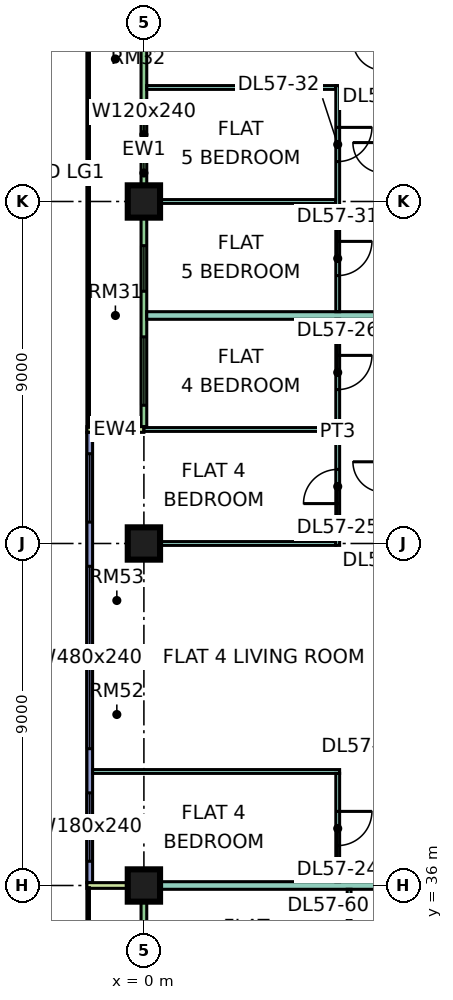
"""IFC4 building model, lengths in metres.
Left out: names, types, materials, properties, quantities, classifications, styles, units other than length and angle.
Written with IfcOpenShell. Run it as: python <this file> out.ifc"""

import sys

from ifc_helpers import new_model, si_unit, direction, frame, frame_2d, origin, origin_2d, place, context, subcontext, project, spatial, rectangle, extrude, element, fill, save


model = new_model("IFC4")
c1 = context("Model", 3, precision=1e-05, world=origin(), true_north=direction((0.0, 1.0)))
c2 = subcontext(c1, "Body", "Model", "MODEL_VIEW")
j1 = project(units=[si_unit("LENGTHUNIT", "METRE"), si_unit("PLANEANGLEUNIT", "RADIAN")], contexts=[c1])
p1 = place(None, origin())
s1 = spatial("IfcSite", under=j1, at=p1, CompositionType="ELEMENT")
p2 = place(p1, origin())
s2 = spatial("IfcBuilding", under=s1, at=p2, CompositionType="ELEMENT")
p3 = place(p2, frame((0.0, 0.0, 241.65)))
s3 = spatial("IfcBuildingStorey", under=s2, at=p3, CompositionType="ELEMENT", Elevation=241.65)
p4 = place(p3, frame((0.0, 36.0, 0.0), z_axis=(0.0, 0.0, 1.0), x_axis=(1.0, 0.0, 0.0)))
e1 = element("IfcColumn", 1, at=p4, inside=s3, PredefinedType="COLUMN", context=c2, shape_type="SweptSolid", body=[
    extrude(rectangle(XDim=0.85, YDim=0.85, at=origin_2d()), origin(), (0.0, 0.0, 1.0), 3.75),
])
p5 = place(p3, frame((0.0, 45.0, 0.0), z_axis=(0.0, 0.0, 1.0), x_axis=(1.0, 0.0, 0.0)))
e2 = element("IfcColumn", 2, at=p5, inside=s3, PredefinedType="COLUMN", context=c2, shape_type="SweptSolid", body=[
    extrude(rectangle(XDim=0.85, YDim=0.85, at=origin_2d()), origin(), (0.0, 0.0, 1.0), 3.75),
])
p6 = place(p3, frame((0.0, 54.0, 0.0), z_axis=(0.0, 0.0, 1.0), x_axis=(1.0, 0.0, 0.0)))
e3 = element("IfcColumn", 3, at=p6, inside=s3, PredefinedType="COLUMN", context=c2, shape_type="SweptSolid", body=[
    extrude(rectangle(XDim=0.85, YDim=0.85, at=origin_2d()), origin(), (0.0, 0.0, 1.0), 3.75),
])
p7 = place(p3, frame((0.0, 61.425, 0.0), z_axis=(0.0, 0.0, 1.0), x_axis=(0.0, -1.0, 0.0)))
e4 = element("IfcWall", 4, at=p7, inside=s3, PredefinedType="SOLIDWALL", context=c2, shape_type="SweptSolid", body=[
    extrude(rectangle(XDim=13.35, YDim=0.15, at=frame_2d((6.675, 0.0))), origin(), (0.0, 0.0, 1.0), 3.35),
])
p8 = place(p7, frame((1.312, 0.0, 0.0)))
e5 = element("IfcOpeningElement", 5, at=p8, cuts=e4, PredefinedType="OPENING", context=c2, shape_type="SweptSolid", body=[
    extrude(rectangle(XDim=1.8, YDim=2.4, at=frame_2d((0.9, 1.2))), frame((0.0, 0.085, 0.0), z_axis=(0.0, -1.0, 0.0), x_axis=(1.0, 0.0, 0.0)), (0.0, 0.0, 1.0), 0.17),
])
p9 = place(p7, frame((5.062, 0.0, 0.45)))
e6 = element("IfcOpeningElement", 6, at=p9, cuts=e4, PredefinedType="OPENING", context=c2, shape_type="SweptSolid", body=[
    extrude(rectangle(XDim=1.2, YDim=2.4, at=frame_2d((0.6, 1.2))), frame((0.0, 0.085, 0.0), z_axis=(0.0, -1.0, 0.0), x_axis=(1.0, 0.0, 0.0)), (0.0, 0.0, 1.0), 0.17),
])
p10 = place(p7, frame((8.587, 0.0, 0.45)))
e7 = element("IfcOpeningElement", 7, at=p10, cuts=e4, PredefinedType="OPENING", context=c2, shape_type="SweptSolid", body=[
    extrude(rectangle(XDim=1.2, YDim=2.4, at=frame_2d((0.6, 1.2))), frame((0.0, 0.085, 0.0), z_axis=(0.0, -1.0, 0.0), x_axis=(1.0, 0.0, 0.0)), (0.0, 0.0, 1.0), 0.17),
])
p11 = place(p7, frame((10.988, 0.0, 0.45)))
e8 = element("IfcOpeningElement", 8, at=p11, cuts=e4, PredefinedType="OPENING", context=c2, shape_type="SweptSolid", body=[
    extrude(rectangle(XDim=1.8, YDim=2.4, at=frame_2d((0.9, 1.2))), frame((0.0, 0.085, 0.0), z_axis=(0.0, -1.0, 0.0), x_axis=(1.0, 0.0, 0.0)), (0.0, 0.0, 1.0), 0.17),
])
p12 = place(p3, frame((-1.5, 48.0, 0.0), z_axis=(0.0, 0.0, 1.0), x_axis=(1.0, 0.0, 0.0)))
e9 = element("IfcWall", 9, at=p12, inside=s3, PredefinedType="SOLIDWALL", context=c2, shape_type="SweptSolid", body=[
    extrude(rectangle(XDim=1.5, YDim=0.15, at=frame_2d((0.75, 0.0))), origin(), (0.0, 0.0, 1.0), 3.35),
])
p13 = place(p3, frame((-1.425, 47.925, 0.0), z_axis=(0.0, 0.0, 1.0), x_axis=(0.0, -1.0, 0.0)))
e10 = element("IfcWall", 10, at=p13, inside=s3, PredefinedType="SOLIDWALL", context=c2, shape_type="SweptSolid", body=[
    extrude(rectangle(XDim=11.85, YDim=0.15, at=frame_2d((5.925, 0.0))), origin(), (0.0, 0.0, 1.0), 3.35),
])
p14 = place(p13, frame((0.562, 0.0, 0.45)))
e11 = element("IfcOpeningElement", 11, at=p14, cuts=e10, PredefinedType="OPENING", context=c2, shape_type="SweptSolid", body=[
    extrude(rectangle(XDim=1.8, YDim=2.4, at=frame_2d((0.9, 1.2))), frame((0.0, 0.085, 0.0), z_axis=(0.0, -1.0, 0.0), x_axis=(1.0, 0.0, 0.0)), (0.0, 0.0, 1.0), 0.17),
])
p15 = place(p13, frame((3.525, 0.0, 0.45)))
e12 = element("IfcOpeningElement", 12, at=p15, cuts=e10, PredefinedType="OPENING", context=c2, shape_type="SweptSolid", body=[
    extrude(rectangle(XDim=4.8, YDim=2.4, at=frame_2d((2.4, 1.2))), frame((0.0, 0.085, 0.0), z_axis=(0.0, -1.0, 0.0), x_axis=(1.0, 0.0, 0.0)), (0.0, 0.0, 1.0), 0.17),
])
p16 = place(p13, frame((9.488, 0.0, 0.45)))
e13 = element("IfcOpeningElement", 13, at=p16, cuts=e10, PredefinedType="OPENING", context=c2, shape_type="SweptSolid", body=[
    extrude(rectangle(XDim=1.8, YDim=2.4, at=frame_2d((0.9, 1.2))), frame((0.0, 0.085, 0.0), z_axis=(0.0, -1.0, 0.0), x_axis=(1.0, 0.0, 0.0)), (0.0, 0.0, 1.0), 0.17),
])
p17 = place(p3, frame((0.0, 35.925, 0.0), z_axis=(0.0, 0.0, 1.0), x_axis=(0.0, -1.0, 0.0)))
e14 = element("IfcWall", 14, at=p17, inside=s3, PredefinedType="SOLIDWALL", context=c2, shape_type="SweptSolid", body=[
    extrude(rectangle(XDim=11.85, YDim=0.15, at=frame_2d((5.925, 0.0))), origin(), (0.0, 0.0, 1.0), 3.35),
])
p18 = place(p17, frame((1.087, 0.0, 0.0)))
e15 = element("IfcOpeningElement", 15, at=p18, cuts=e14, PredefinedType="OPENING", context=c2, shape_type="SweptSolid", body=[
    extrude(rectangle(XDim=1.2, YDim=2.4, at=frame_2d((0.6, 1.2))), frame((0.0, 0.085, 0.0), z_axis=(0.0, -1.0, 0.0), x_axis=(1.0, 0.0, 0.0)), (0.0, 0.0, 1.0), 0.17),
])
p19 = place(p17, frame((3.525, 0.0, 0.45)))
e16 = element("IfcOpeningElement", 16, at=p19, cuts=e14, PredefinedType="OPENING", context=c2, shape_type="SweptSolid", body=[
    extrude(rectangle(XDim=1.8, YDim=2.4, at=frame_2d((0.9, 1.2))), frame((0.0, 0.085, 0.0), z_axis=(0.0, -1.0, 0.0), x_axis=(1.0, 0.0, 0.0)), (0.0, 0.0, 1.0), 0.17),
])
p20 = place(p17, frame((7.163, 0.0, 0.45)))
e17 = element("IfcOpeningElement", 17, at=p20, cuts=e14, PredefinedType="OPENING", context=c2, shape_type="SweptSolid", body=[
    extrude(rectangle(XDim=3.0, YDim=2.4, at=frame_2d((1.5, 1.2))), frame((0.0, 0.085, 0.0), z_axis=(0.0, -1.0, 0.0), x_axis=(1.0, 0.0, 0.0)), (0.0, 0.0, 1.0), 0.17),
])
p21 = place(p3, frame((-1.5, 36.0, 0.0), z_axis=(0.0, 0.0, 1.0), x_axis=(1.0, 0.0, 0.0)))
e18 = element("IfcWall", 18, at=p21, inside=s3, PredefinedType="SOLIDWALL", context=c2, shape_type="SweptSolid", body=[
    extrude(rectangle(XDim=1.5, YDim=0.15, at=frame_2d((0.75, 0.0))), origin(), (0.0, 0.0, 1.0), 3.35),
])
e19 = element("IfcWall", 19, at=p4, inside=s3, PredefinedType="PARTITIONING", context=c2, shape_type="SweptSolid", body=[
    extrude(rectangle(XDim=6.375, YDim=0.2, at=frame_2d((3.188, 0.0))), origin(), (0.0, 0.0, 1.0), 3.35),
])
p22 = place(p3, frame((-1.35, 39.0, 0.0), z_axis=(0.0, 0.0, 1.0), x_axis=(1.0, 0.0, 0.0)))
e20 = element("IfcWall", 20, at=p22, inside=s3, PredefinedType="PARTITIONING", context=c2, shape_type="SweptSolid", body=[
    extrude(rectangle(XDim=6.5, YDim=0.1, at=frame_2d((3.25, 0.0))), origin(), (0.0, 0.0, 1.0), 3.35),
])
e21 = element("IfcWall", 21, at=p5, inside=s3, PredefinedType="PARTITIONING", context=c2, shape_type="SweptSolid", body=[
    extrude(rectangle(XDim=5.05, YDim=0.1, at=frame_2d((2.525, 0.0))), origin(), (0.0, 0.0, 1.0), 3.35),
])
p23 = place(p3, frame((0.0, 48.0, 0.0), z_axis=(0.0, 0.0, 1.0), x_axis=(1.0, 0.0, 0.0)))
e22 = element("IfcWall", 22, at=p23, inside=s3, PredefinedType="PARTITIONING", context=c2, shape_type="SweptSolid", body=[
    extrude(rectangle(XDim=5.05, YDim=0.1, at=frame_2d((2.525, 0.0))), origin(), (0.0, 0.0, 1.0), 3.35),
])
p24 = place(p3, frame((0.074, 51.0, 0.0), z_axis=(0.0, 0.0, 1.0), x_axis=(1.0, 0.0, 0.0)))
e23 = element("IfcWall", 23, at=p24, inside=s3, PredefinedType="PARTITIONING", context=c2, shape_type="SweptSolid", body=[
    extrude(rectangle(XDim=9.426, YDim=0.2, at=frame_2d((4.713, 0.0))), origin(), (0.0, 0.0, 1.0), 3.35),
])
for number, where, z_axis, x_axis in (
    (24, (0.074, 54.0, 0.0), (0.0, 0.0, 1.0), (1.0, 0.0, 0.0)),
    (25, (0.074, 57.0, 0.0), (0.0, 0.0, 1.0), (1.0, 0.0, 0.0)),
):
    element("IfcWall", number, at=place(p3, frame(where, z_axis=z_axis, x_axis=x_axis)), inside=s3, PredefinedType="PARTITIONING", context=c2, shape_type="SweptSolid", body=[
        extrude(rectangle(XDim=4.976, YDim=0.1, at=frame_2d((2.488, 0.0))), origin(), (0.0, 0.0, 1.0), 3.35),
    ])
p25 = place(p3, frame((5.1, 36.1, 0.0), z_axis=(0.0, 0.0, 1.0), x_axis=(0.0, 1.0, 0.0)))
e26 = element("IfcWall", 26, at=p25, inside=s3, PredefinedType="PARTITIONING", context=c2, shape_type="SweptSolid", body=[
    extrude(rectangle(XDim=2.85, YDim=0.1, at=frame_2d((1.425, 0.0))), origin(), (0.0, 0.0, 1.0), 3.35),
])
p26 = place(p25, frame((0.95, 0.0, 0.0)))
e27 = element("IfcOpeningElement", 27, at=p26, cuts=e26, PredefinedType="OPENING", context=c2, shape_type="SweptSolid", body=[
    extrude(rectangle(XDim=0.9, YDim=2.1, at=frame_2d((0.45, 1.05))), frame((0.0, 0.06, 0.0), z_axis=(0.0, -1.0, 0.0), x_axis=(1.0, 0.0, 0.0)), (0.0, 0.0, 1.0), 0.12),
])
p27 = place(p3, frame((5.1, 44.95, 0.0), z_axis=(0.0, 0.0, 1.0), x_axis=(0.0, 1.0, 0.0)))
e28 = element("IfcWall", 28, at=p27, inside=s3, PredefinedType="PARTITIONING", context=c2, shape_type="SweptSolid", body=[
    extrude(rectangle(XDim=5.95, YDim=0.1, at=frame_2d((2.975, 0.0))), origin(), (0.0, 0.0, 1.0), 3.35),
])
p28 = place(p27, frame((1.1, 0.0, 0.0)))
e29 = element("IfcOpeningElement", 29, at=p28, cuts=e28, PredefinedType="OPENING", context=c2, shape_type="SweptSolid", body=[
    extrude(rectangle(XDim=0.9, YDim=2.1, at=frame_2d((0.45, 1.05))), frame((0.0, 0.06, 0.0), z_axis=(0.0, -1.0, 0.0), x_axis=(1.0, 0.0, 0.0)), (0.0, 0.0, 1.0), 0.12),
])
p29 = place(p27, frame((4.1, 0.0, 0.0)))
e30 = element("IfcOpeningElement", 30, at=p29, cuts=e28, PredefinedType="OPENING", context=c2, shape_type="SweptSolid", body=[
    extrude(rectangle(XDim=0.9, YDim=2.1, at=frame_2d((0.45, 1.05))), frame((0.0, 0.06, 0.0), z_axis=(0.0, -1.0, 0.0), x_axis=(1.0, 0.0, 0.0)), (0.0, 0.0, 1.0), 0.12),
])
p30 = place(p3, frame((5.1, 51.1, 0.0), z_axis=(0.0, 0.0, 1.0), x_axis=(0.0, 1.0, 0.0)))
e31 = element("IfcWall", 31, at=p30, inside=s3, PredefinedType="PARTITIONING", context=c2, shape_type="SweptSolid", body=[
    extrude(rectangle(XDim=5.95, YDim=0.1, at=frame_2d((2.975, 0.0))), origin(), (0.0, 0.0, 1.0), 3.35),
])
p31 = place(p30, frame((0.95, 0.0, 0.0)))
e32 = element("IfcOpeningElement", 32, at=p31, cuts=e31, PredefinedType="OPENING", context=c2, shape_type="SweptSolid", body=[
    extrude(rectangle(XDim=0.9, YDim=2.1, at=frame_2d((0.45, 1.05))), frame((0.0, 0.06, 0.0), z_axis=(0.0, -1.0, 0.0), x_axis=(1.0, 0.0, 0.0)), (0.0, 0.0, 1.0), 0.12),
])
p32 = place(p30, frame((3.95, 0.0, 0.0)))
e33 = element("IfcOpeningElement", 33, at=p32, cuts=e31, PredefinedType="OPENING", context=c2, shape_type="SweptSolid", body=[
    extrude(rectangle(XDim=0.9, YDim=2.1, at=frame_2d((0.45, 1.05))), frame((0.0, 0.06, 0.0), z_axis=(0.0, -1.0, 0.0), x_axis=(1.0, 0.0, 0.0)), (0.0, 0.0, 1.0), 0.12),
])
p33 = place(p3, frame((5.4, 29.95, 0.0), z_axis=(0.0, 0.0, 1.0), x_axis=(0.0, 1.0, 0.0)))
e34 = element("IfcWall", 34, at=p33, inside=s3, PredefinedType="PARTITIONING", context=c2, shape_type="SweptSolid", body=[
    extrude(rectangle(XDim=5.95, YDim=0.1, at=frame_2d((2.975, 0.0))), origin(), (0.0, 0.0, 1.0), 3.35),
])
p34 = place(p33, frame((1.1, 0.0, 0.0)))
e35 = element("IfcOpeningElement", 35, at=p34, cuts=e34, PredefinedType="OPENING", context=c2, shape_type="SweptSolid", body=[
    extrude(rectangle(XDim=0.9, YDim=2.1, at=frame_2d((0.45, 1.05))), frame((0.0, 0.06, 0.0), z_axis=(0.0, -1.0, 0.0), x_axis=(1.0, 0.0, 0.0)), (0.0, 0.0, 1.0), 0.12),
])
p35 = place(p33, frame((4.1, 0.0, 0.0)))
e36 = element("IfcOpeningElement", 36, at=p35, cuts=e34, PredefinedType="OPENING", context=c2, shape_type="SweptSolid", body=[
    extrude(rectangle(XDim=0.9, YDim=2.1, at=frame_2d((0.45, 1.05))), frame((0.0, 0.06, 0.0), z_axis=(0.0, -1.0, 0.0), x_axis=(1.0, 0.0, 0.0)), (0.0, 0.0, 1.0), 0.12),
])
p36 = place(p9, origin())
e37 = element("IfcWindow", 37, at=p36, inside=s3, PartitioningType="SINGLE_PANEL", PredefinedType="WINDOW", context=c2, shape_type="SweptSolid", body=[
    extrude(rectangle(XDim=1.2, YDim=2.4, at=frame_2d((0.6, 1.2))), frame((0.0, 0.03, 0.0), z_axis=(0.0, -1.0, 0.0), x_axis=(1.0, 0.0, 0.0)), (0.0, 0.0, 1.0), 0.06),
])
fill(e6, e37)
p37 = place(p10, origin())
e38 = element("IfcWindow", 38, at=p37, inside=s3, PartitioningType="SINGLE_PANEL", PredefinedType="WINDOW", context=c2, shape_type="SweptSolid", body=[
    extrude(rectangle(XDim=1.2, YDim=2.4, at=frame_2d((0.6, 1.2))), frame((0.0, 0.03, 0.0), z_axis=(0.0, -1.0, 0.0), x_axis=(1.0, 0.0, 0.0)), (0.0, 0.0, 1.0), 0.06),
])
fill(e7, e38)
p38 = place(p11, origin())
e39 = element("IfcWindow", 39, at=p38, inside=s3, PartitioningType="SINGLE_PANEL", PredefinedType="WINDOW", context=c2, shape_type="SweptSolid", body=[
    extrude(rectangle(XDim=1.8, YDim=2.4, at=frame_2d((0.9, 1.2))), frame((0.0, 0.03, 0.0), z_axis=(0.0, -1.0, 0.0), x_axis=(1.0, 0.0, 0.0)), (0.0, 0.0, 1.0), 0.06),
])
fill(e8, e39)
p39 = place(p14, origin())
e40 = element("IfcWindow", 40, at=p39, inside=s3, PartitioningType="SINGLE_PANEL", PredefinedType="WINDOW", context=c2, shape_type="SweptSolid", body=[
    extrude(rectangle(XDim=1.8, YDim=2.4, at=frame_2d((0.9, 1.2))), frame((0.0, 0.03, 0.0), z_axis=(0.0, -1.0, 0.0), x_axis=(1.0, 0.0, 0.0)), (0.0, 0.0, 1.0), 0.06),
])
fill(e11, e40)
p40 = place(p15, origin())
e41 = element("IfcWindow", 41, at=p40, inside=s3, PartitioningType="SINGLE_PANEL", PredefinedType="WINDOW", context=c2, shape_type="SweptSolid", body=[
    extrude(rectangle(XDim=4.8, YDim=2.4, at=frame_2d((2.4, 1.2))), frame((0.0, 0.03, 0.0), z_axis=(0.0, -1.0, 0.0), x_axis=(1.0, 0.0, 0.0)), (0.0, 0.0, 1.0), 0.06),
])
fill(e12, e41)
p41 = place(p16, origin())
e42 = element("IfcWindow", 42, at=p41, inside=s3, PartitioningType="SINGLE_PANEL", PredefinedType="WINDOW", context=c2, shape_type="SweptSolid", body=[
    extrude(rectangle(XDim=1.8, YDim=2.4, at=frame_2d((0.9, 1.2))), frame((0.0, 0.03, 0.0), z_axis=(0.0, -1.0, 0.0), x_axis=(1.0, 0.0, 0.0)), (0.0, 0.0, 1.0), 0.06),
])
fill(e13, e42)
p42 = place(p26, origin())
e43 = element("IfcDoor", 43, at=p42, inside=s3, OperationType="SINGLE_SWING_RIGHT", PredefinedType="DOOR", context=c2, shape_type="SweptSolid", body=[
    extrude(rectangle(XDim=0.9, YDim=2.1, at=frame_2d((0.45, 1.05))), frame((0.0, 0.025, 0.0), z_axis=(0.0, -1.0, 0.0), x_axis=(1.0, 0.0, 0.0)), (0.0, 0.0, 1.0), 0.05),
])
fill(e27, e43)
p43 = place(p28, origin())
e44 = element("IfcDoor", 44, at=p43, inside=s3, OperationType="SINGLE_SWING_LEFT", PredefinedType="DOOR", context=c2, shape_type="SweptSolid", body=[
    extrude(rectangle(XDim=0.9, YDim=2.1, at=frame_2d((0.45, 1.05))), frame((0.0, 0.025, 0.0), z_axis=(0.0, -1.0, 0.0), x_axis=(1.0, 0.0, 0.0)), (0.0, 0.0, 1.0), 0.05),
])
fill(e29, e44)
p44 = place(p29, origin())
e45 = element("IfcDoor", 45, at=p44, inside=s3, OperationType="SINGLE_SWING_RIGHT", PredefinedType="DOOR", context=c2, shape_type="SweptSolid", body=[
    extrude(rectangle(XDim=0.9, YDim=2.1, at=frame_2d((0.45, 1.05))), frame((0.0, 0.025, 0.0), z_axis=(0.0, -1.0, 0.0), x_axis=(1.0, 0.0, 0.0)), (0.0, 0.0, 1.0), 0.05),
])
fill(e30, e45)
p45 = place(p31, origin())
e46 = element("IfcDoor", 46, at=p45, inside=s3, OperationType="SINGLE_SWING_RIGHT", PredefinedType="DOOR", context=c2, shape_type="SweptSolid", body=[
    extrude(rectangle(XDim=0.9, YDim=2.1, at=frame_2d((0.45, 1.05))), frame((0.0, 0.025, 0.0), z_axis=(0.0, -1.0, 0.0), x_axis=(1.0, 0.0, 0.0)), (0.0, 0.0, 1.0), 0.05),
])
fill(e32, e46)
p46 = place(p32, origin())
e47 = element("IfcDoor", 47, at=p46, inside=s3, OperationType="SINGLE_SWING_RIGHT", PredefinedType="DOOR", context=c2, shape_type="SweptSolid", body=[
    extrude(rectangle(XDim=0.9, YDim=2.1, at=frame_2d((0.45, 1.05))), frame((0.0, 0.025, 0.0), z_axis=(0.0, -1.0, 0.0), x_axis=(1.0, 0.0, 0.0)), (0.0, 0.0, 1.0), 0.05),
])
fill(e33, e47)
save(model, sys.argv[1])
